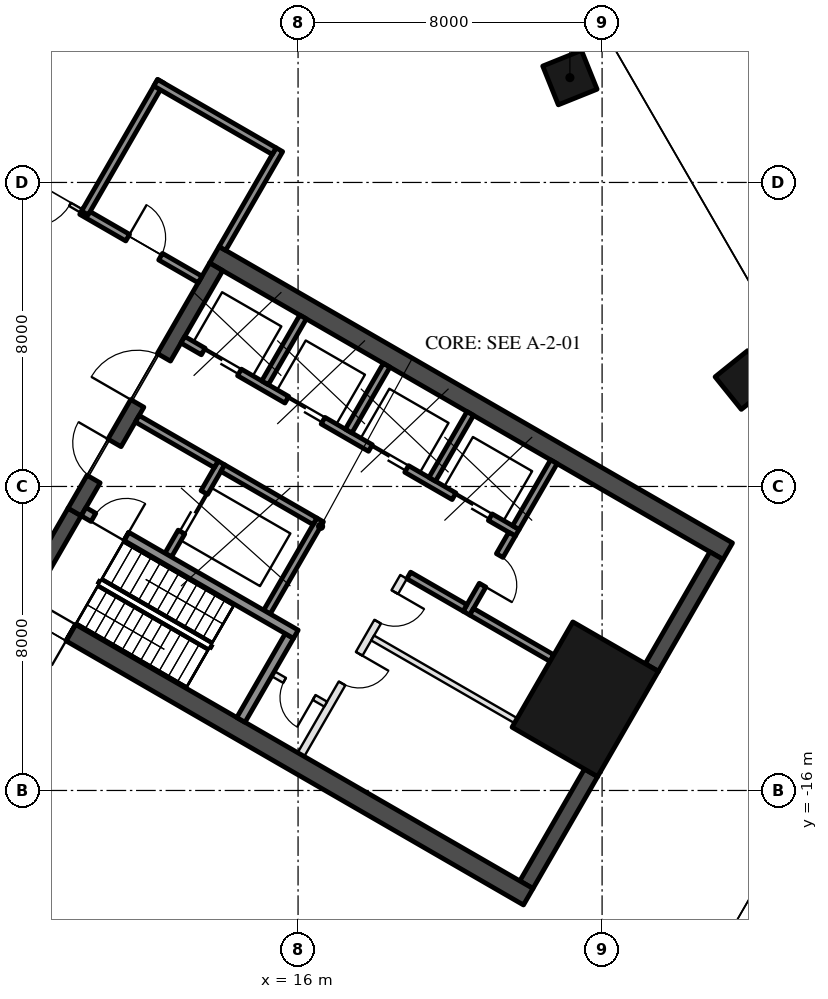
"""IFC4 building model, lengths in metres.
Left out: names, types, materials, properties, quantities, classifications, styles, units other than length and angle.
Written with IfcOpenShell. Run it as: python <this file> out.ifc"""

import sys

from ifc_helpers import new_model, si_unit, direction, frame, frame_2d, origin, origin_2d, place, context, subcontext, project, spatial, rectangle, hollow_rectangle, extrude, boolean, halfspace, element, fill, save


model = new_model("IFC4")
c1 = context("Model", 3, precision=1e-05, world=origin(), true_north=direction((0.0, 1.0)))
c2 = subcontext(c1, "Body", "Model", "MODEL_VIEW")
j1 = project(units=[si_unit("LENGTHUNIT", "METRE"), si_unit("PLANEANGLEUNIT", "RADIAN")], contexts=[c1])
p1 = place(None, origin())
s1 = spatial("IfcSite", under=j1, at=p1, CompositionType="ELEMENT")
p2 = place(p1, origin())
s2 = spatial("IfcBuilding", under=s1, at=p2, CompositionType="ELEMENT")
p3 = place(p2, origin())
s3 = spatial("IfcBuildingStorey", under=s2, at=p3, CompositionType="ELEMENT", Elevation=0.0)
p4 = place(p3, frame((27.747, -5.199, 0.0), z_axis=(-0.187040427199, 0.029060254354, 0.981922288274), x_axis=(0.488808494451, -0.86427960463, 0.118688755878)))
e1 = element("IfcColumn", 1, at=p4, inside=s3, PredefinedType="COLUMN", context=c2, shape_type="SweptSolid", body=[
    boolean("DIFFERENCE", extrude(hollow_rectangle(XDim=1.1, YDim=1.1, WallThickness=0.05, at=origin_2d()), origin(), (0.0, 0.0, 1.0), 9.166), halfspace(frame((0.0, 0.0, 9.146), z_axis=(0.0, 0.0, 1.0), x_axis=(1.0, 0.0, 0.0)), False)),
])
p5 = place(p3, frame((23.153, 2.758, 0.0), z_axis=(-0.158231651294, -0.022440027718, 0.987146994973), x_axis=(0.495168958636, -0.866745273107, 0.059668534009)))
e2 = element("IfcColumn", 2, at=p5, inside=s3, PredefinedType="COLUMN", context=c2, shape_type="SweptSolid", body=[
    boolean("DIFFERENCE", extrude(hollow_rectangle(XDim=1.1, YDim=1.1, WallThickness=0.05, at=origin_2d()), origin(), (0.0, 0.0, 1.0), 9.117), halfspace(frame((0.0, 0.0, 9.101), z_axis=(0.0, 0.0, 1.0), x_axis=(1.0, 0.0, 0.0)), False)),
])
p6 = place(p3, frame((23.556, -13.6, 0.0), z_axis=(0.0, 0.0, 1.0), x_axis=(0.5, 0.866025403784, 0.0)))
e3 = element("IfcColumn", 3, at=p6, inside=s3, PredefinedType="COLUMN", context=c2, shape_type="SweptSolid", body=[
    extrude(hollow_rectangle(XDim=3.2, YDim=2.6, WallThickness=0.08, at=origin_2d()), origin(), (0.0, 0.0, 1.0), 9.0),
])
p7 = place(p3, frame((13.797, -1.903, 0.0), z_axis=(0.0, 0.0, 1.0), x_axis=(0.866024264262, -0.500001973705, 0.0)))
e4 = element("IfcWall", 4, at=p7, inside=s3, PredefinedType="SHEAR", context=c2, shape_type="SweptSolid", body=[
    extrude(rectangle(XDim=15.6, YDim=0.5, at=frame_2d((7.8, 0.0))), origin(), (0.0, 0.0, 1.0), 8.7),
])
p8 = place(p3, frame((25.309, -12.764, 0.0), z_axis=(0.0, 0.0, 1.0), x_axis=(0.499977295307, 0.866038511948, 0.0)))
e5 = element("IfcWall", 5, at=p8, inside=s3, PredefinedType="SHEAR", context=c2, shape_type="SweptSolid", body=[
    extrude(rectangle(XDim=3.4, YDim=0.4, at=frame_2d((1.7, 0.0))), origin(), (0.0, 0.0, 1.0), 8.7),
])
p9 = place(p3, frame((22.009, -18.48, 0.0), z_axis=(0.0, 0.0, 1.0), x_axis=(0.500008388397, 0.866020560687, 0.0)))
e6 = element("IfcWall", 6, at=p9, inside=s3, PredefinedType="SHEAR", context=c2, shape_type="SweptSolid", body=[
    extrude(rectangle(XDim=3.4, YDim=0.4, at=frame_2d((1.7, 0.0))), origin(), (0.0, 0.0, 1.0), 8.7),
])
p10 = place(p3, frame((14.496, -14.143, 0.0), z_axis=(0.0, 0.0, 1.0), x_axis=(0.500062241894, 0.865989465428, 0.0)))
e7 = element("IfcWall", 7, at=p10, inside=s3, PredefinedType="SHEAR", context=c2, shape_type="SweptSolid", body=[
    extrude(rectangle(XDim=2.55, YDim=0.25, at=frame_2d((1.275, 0.0))), origin(), (0.0, 0.0, 1.0), 8.7),
])
p11 = place(p3, frame((15.181, -11.305, 0.0), z_axis=(0.0, 0.0, 1.0), x_axis=(0.49994636267, 0.866056369097, 0.0)))
e8 = element("IfcWall", 8, at=p11, inside=s3, PredefinedType="SHEAR", context=c2, shape_type="SweptSolid", body=[
    extrude(rectangle(XDim=2.8, YDim=0.2, at=frame_2d((1.4, 0.0))), origin(), (0.0, 0.0, 1.0), 8.7),
])
p12 = place(p3, frame((12.583, -9.805, 0.0), z_axis=(0.0, 0.0, 1.0), x_axis=(0.49994636267, 0.866056369097, 0.0)))
e9 = element("IfcWall", 9, at=p12, inside=s3, PredefinedType="SHEAR", context=c2, shape_type="SweptSolid", body=[
    extrude(rectangle(XDim=2.8, YDim=0.2, at=frame_2d((1.4, 0.0))), origin(), (0.0, 0.0, 1.0), 8.7),
])
p13 = place(p12, frame((0.7, 0.0, 0.0)))
e10 = element("IfcOpeningElement", 10, at=p13, cuts=e9, PredefinedType="OPENING", context=c2, shape_type="SweptSolid", body=[
    extrude(rectangle(XDim=1.2, YDim=2.1, at=frame_2d((0.6, 1.05))), frame((0.0, 0.11, 0.0), z_axis=(0.0, -1.0, 0.0), x_axis=(1.0, 0.0, 0.0)), (0.0, 0.0, 1.0), 0.22),
])
p14 = place(p3, frame((11.768, -6.217, 0.0), z_axis=(0.0, 0.0, 1.0), x_axis=(0.866050077142, -0.499957262057, 0.0)))
e11 = element("IfcWall", 11, at=p14, inside=s3, PredefinedType="SHEAR", context=c2, shape_type="SweptSolid", body=[
    extrude(rectangle(XDim=2.4, YDim=0.2, at=frame_2d((1.2, 0.0))), origin(), (0.0, 0.0, 1.0), 8.7),
])
p15 = place(p3, frame((14.02, -7.517, 0.0), z_axis=(0.0, 0.0, 1.0), x_axis=(0.866034573852, -0.49998411664, 0.0)))
e12 = element("IfcWall", 12, at=p15, inside=s3, PredefinedType="SHEAR", context=c2, shape_type="SweptSolid", body=[
    extrude(rectangle(XDim=2.8, YDim=0.2, at=frame_2d((1.4, 0.0))), origin(), (0.0, 0.0, 1.0), 8.7),
])
p16 = place(p3, frame((12.968, -4.138, 0.0), z_axis=(0.0, 0.0, 1.0), x_axis=(0.866028328073, -0.49999493495, 0.0)))
e13 = element("IfcWall", 13, at=p16, inside=s3, PredefinedType="SHEAR", context=c2, shape_type="SweptSolid", body=[
    extrude(rectangle(XDim=10.16, YDim=0.2, at=frame_2d((5.08, 0.0))), origin(), (0.0, 0.0, 1.0), 8.7),
])
p17 = place(p16, frame((0.62, 0.0, 0.0)))
e14 = element("IfcOpeningElement", 14, at=p17, cuts=e13, PredefinedType="OPENING", context=c2, shape_type="SweptSolid", body=[
    extrude(rectangle(XDim=1.1, YDim=2.1, at=frame_2d((0.55, 1.05))), frame((0.0, 0.11, 0.0), z_axis=(0.0, -1.0, 0.0), x_axis=(1.0, 0.0, 0.0)), (0.0, 0.0, 1.0), 0.22),
])
p18 = place(p16, frame((3.16, 0.0, 0.0)))
e15 = element("IfcOpeningElement", 15, at=p18, cuts=e13, PredefinedType="OPENING", context=c2, shape_type="SweptSolid", body=[
    extrude(rectangle(XDim=1.1, YDim=2.1, at=frame_2d((0.55, 1.05))), frame((0.0, 0.11, 0.0), z_axis=(0.0, -1.0, 0.0), x_axis=(1.0, 0.0, 0.0)), (0.0, 0.0, 1.0), 0.22),
])
p19 = place(p16, frame((5.7, 0.0, 0.0)))
e16 = element("IfcOpeningElement", 16, at=p19, cuts=e13, PredefinedType="OPENING", context=c2, shape_type="SweptSolid", body=[
    extrude(rectangle(XDim=1.1, YDim=2.1, at=frame_2d((0.55, 1.05))), frame((0.0, 0.11, 0.0), z_axis=(0.0, -1.0, 0.0), x_axis=(1.0, 0.0, 0.0)), (0.0, 0.0, 1.0), 0.22),
])
p20 = place(p16, frame((8.24, 0.0, 0.0)))
e17 = element("IfcOpeningElement", 17, at=p20, cuts=e13, PredefinedType="OPENING", context=c2, shape_type="SweptSolid", body=[
    extrude(rectangle(XDim=1.1, YDim=2.1, at=frame_2d((0.55, 1.05))), frame((0.0, 0.11, 0.0), z_axis=(0.0, -1.0, 0.0), x_axis=(1.0, 0.0, 0.0)), (0.0, 0.0, 1.0), 0.22),
])
p21 = place(p3, frame((20.43, -11.333, 0.0), z_axis=(0.0, 0.0, 1.0), x_axis=(0.500001309137, 0.866024647952, 0.0)))
e18 = element("IfcWall", 18, at=p21, inside=s3, PredefinedType="SHEAR", context=c2, shape_type="SweptSolid", body=[
    extrude(rectangle(XDim=2.4, YDim=0.2, at=frame_2d((1.2, 0.0))), origin(), (0.0, 0.0, 1.0), 8.7),
])
p22 = place(p21, frame((0.85, 0.0, 0.0)))
e19 = element("IfcOpeningElement", 19, at=p22, cuts=e18, PredefinedType="OPENING", context=c2, shape_type="SweptSolid", body=[
    extrude(rectangle(XDim=0.9, YDim=2.1, at=frame_2d((0.45, 1.05))), frame((0.0, 0.11, 0.0), z_axis=(0.0, -1.0, 0.0), x_axis=(1.0, 0.0, 0.0)), (0.0, 0.0, 1.0), 0.22),
])
p23 = place(p3, frame((18.913, -10.342, 0.0), z_axis=(0.0, 0.0, 1.0), x_axis=(0.866038183914, -0.499977863513, 0.0)))
e20 = element("IfcWall", 20, at=p23, inside=s3, PredefinedType="SHEAR", context=c2, shape_type="SweptSolid", body=[
    extrude(rectangle(XDim=1.71, YDim=0.2, at=frame_2d((0.855, 0.0))), origin(), (0.0, 0.0, 1.0), 8.7),
])
for number, where, z_axis, x_axis in (
    (21, (15.131, -5.272, 0.0), (0.0, 0.0, 1.0), (0.5, 0.866, 0.0)),
    (22, (17.331, -6.542, 0.0), (0.0, 0.0, 1.0), (0.5, 0.866, 0.0)),
    (23, (19.531, -7.812, 0.0), (0.0, 0.0, 1.0), (0.5, 0.866, 0.0)),
    (24, (21.73, -9.082, 0.0), (0.0, 0.0, 1.0), (0.5, 0.866, 0.0)),
):
    element("IfcWall", number, at=place(p3, frame(where, z_axis=z_axis, x_axis=x_axis)), inside=s3, PredefinedType="SHEAR", context=c2, shape_type="SweptSolid", body=[
        extrude(rectangle(XDim=2.0, YDim=0.2, at=frame_2d((1.0, 0.0))), origin(), (0.0, 0.0, 1.0), 8.7),
    ])
p24 = place(p3, frame((20.567, -11.297, 0.0), z_axis=(0.0, 0.0, 1.0), x_axis=(0.866048967903, -0.499959183527, 0.0)))
e25 = element("IfcWall", 25, at=p24, inside=s3, PredefinedType="SHEAR", context=c2, shape_type="SweptSolid", body=[
    extrude(rectangle(XDim=2.44, YDim=0.2, at=frame_2d((1.22, 0.0))), origin(), (0.0, 0.0, 1.0), 8.7),
])
p25 = place(p3, frame((16.076, -15.055, 0.0), z_axis=(0.0, 0.0, 1.0), x_axis=(0.499995103361, 0.866028230842, 0.0)))
e26 = element("IfcWall", 26, at=p25, inside=s3, PredefinedType="PARTITIONING", context=c2, shape_type="SweptSolid", body=[
    extrude(rectangle(XDim=5.4, YDim=0.2, at=frame_2d((2.7, 0.0))), origin(), (0.0, 0.0, 1.0), 8.7),
])
p26 = place(p25, frame((2.163, 0.0, 0.0)))
e27 = element("IfcOpeningElement", 27, at=p26, cuts=e26, PredefinedType="OPENING", context=c2, shape_type="SweptSolid", body=[
    extrude(rectangle(XDim=0.9, YDim=2.1, at=frame_2d((0.45, 1.05))), frame((0.0, 0.11, 0.0), z_axis=(0.0, -1.0, 0.0), x_axis=(1.0, 0.0, 0.0)), (0.0, 0.0, 1.0), 0.22),
])
p27 = place(p25, frame((4.038, 0.0, 0.0)))
e28 = element("IfcOpeningElement", 28, at=p27, cuts=e26, PredefinedType="OPENING", context=c2, shape_type="SweptSolid", body=[
    extrude(rectangle(XDim=0.9, YDim=2.1, at=frame_2d((0.45, 1.05))), frame((0.0, 0.11, 0.0), z_axis=(0.0, -1.0, 0.0), x_axis=(1.0, 0.0, 0.0)), (0.0, 0.0, 1.0), 0.22),
])
p28 = place(p3, frame((15.342, -12.928, 0.0), z_axis=(0.0, 0.0, 1.0), x_axis=(0.865989903783, -0.500061482766, 0.0)))
e29 = element("IfcWall", 29, at=p28, inside=s3, PredefinedType="PARTITIONING", context=c2, shape_type="SweptSolid", body=[
    extrude(rectangle(XDim=1.6, YDim=0.15, at=frame_2d((0.8, 0.0))), origin(), (0.0, 0.0, 1.0), 8.7),
])
p29 = place(p28, frame((0.35, 0.0, 0.0)))
e30 = element("IfcOpeningElement", 30, at=p29, cuts=e29, PredefinedType="OPENING", context=c2, shape_type="SweptSolid", body=[
    extrude(rectangle(XDim=0.9, YDim=2.1, at=frame_2d((0.45, 1.05))), frame((0.0, 0.085, 0.0), z_axis=(0.0, -1.0, 0.0), x_axis=(1.0, 0.0, 0.0)), (0.0, 0.0, 1.0), 0.17),
])
p30 = place(p3, frame((17.963, -11.987, 0.0), z_axis=(0.0, 0.0, 1.0), x_axis=(0.866013608182, -0.500020430026, 0.0)))
e31 = element("IfcWall", 31, at=p30, inside=s3, PredefinedType="PARTITIONING", context=c2, shape_type="SweptSolid", body=[
    extrude(rectangle(XDim=4.35, YDim=0.15, at=frame_2d((2.175, 0.0))), origin(), (0.0, 0.0, 1.0), 8.7),
])
p31 = place(p3, frame((8.547, -10.997, 0.0), z_axis=(0.0, 0.0, 1.0), x_axis=(0.866033076574, -0.499986710104, 0.0)))
e32 = element("IfcWall", 32, at=p31, inside=s3, PredefinedType="SHEAR", context=c2, shape_type="SweptSolid", body=[
    extrude(rectangle(XDim=1.706, YDim=0.5, at=frame_2d((0.853, 0.0))), origin(), (0.0, 0.0, 1.0), 8.7),
])
p32 = place(p31, frame((0.7, 0.0, 0.0)))
e33 = element("IfcOpeningElement", 33, at=p32, cuts=e32, PredefinedType="OPENING", context=c2, shape_type="SweptSolid", body=[
    extrude(rectangle(XDim=1.0, YDim=2.1, at=frame_2d((0.5, 1.05))), frame((0.0, 0.26, 0.0), z_axis=(0.0, -1.0, 0.0), x_axis=(1.0, 0.0, 0.0)), (0.0, 0.0, 1.0), 0.52),
])
p33 = place(p3, frame((10.024, -11.85, 0.0), z_axis=(0.0, 0.0, 1.0), x_axis=(0.86602318214, -0.500003847982, 0.0)))
e34 = element("IfcWall", 34, at=p33, inside=s3, PredefinedType="SHEAR", context=c2, shape_type="SweptSolid", body=[
    extrude(rectangle(XDim=13.894, YDim=0.5, at=frame_2d((6.947, 0.0))), origin(), (0.0, 0.0, 1.0), 8.7),
])
p34 = place(p3, frame((8.845, -10.88, 0.0), z_axis=(0.0, 0.0, 1.0), x_axis=(0.499990435942, 0.866030925526, 0.0)))
e35 = element("IfcWall", 35, at=p34, inside=s3, PredefinedType="SHEAR", context=c2, shape_type="SweptSolid", body=[
    extrude(rectangle(XDim=2.55, YDim=0.4, at=frame_2d((1.275, 0.0))), origin(), (0.0, 0.0, 1.0), 8.7),
])
p35 = place(p3, frame((10.12, -8.672, 0.0), z_axis=(0.0, 0.0, 1.0), x_axis=(0.500008956979, 0.866020232408, 0.0)))
e36 = element("IfcWall", 36, at=p35, inside=s3, PredefinedType="SHEAR", context=c2, shape_type="SweptSolid", body=[
    extrude(rectangle(XDim=7.45, YDim=0.4, at=frame_2d((3.725, 0.0))), origin(), (0.0, 0.0, 1.0), 8.7),
])
p36 = place(p35, frame((1.0, 0.0, 0.0)))
e37 = element("IfcOpeningElement", 37, at=p36, cuts=e36, PredefinedType="OPENING", context=c2, shape_type="SweptSolid", body=[
    extrude(rectangle(XDim=1.1, YDim=2.1, at=frame_2d((0.55, 1.05))), frame((0.0, 0.21, 0.0), z_axis=(0.0, -1.0, 0.0), x_axis=(1.0, 0.0, 0.0)), (0.0, 0.0, 1.0), 0.42),
])
p37 = place(p35, frame((3.3, 0.0, 0.0)))
e38 = element("IfcOpeningElement", 38, at=p37, cuts=e36, PredefinedType="OPENING", context=c2, shape_type="SweptSolid", body=[
    extrude(rectangle(XDim=1.4, YDim=2.1, at=frame_2d((0.7, 1.05))), frame((0.0, 0.21, 0.0), z_axis=(0.0, -1.0, 0.0), x_axis=(1.0, 0.0, 0.0)), (0.0, 0.0, 1.0), 0.42),
])
p38 = place(p3, frame((10.356, -8.664, 0.0), z_axis=(0.0, 0.0, 1.0), x_axis=(0.866095317631, -0.499878886109, 0.0)))
e39 = element("IfcWall", 39, at=p38, inside=s3, PredefinedType="SHEAR", context=c2, shape_type="SweptSolid", body=[
    extrude(rectangle(XDim=1.306, YDim=0.25, at=frame_2d((0.653, 0.0))), origin(), (0.0, 0.0, 1.0), 8.7),
])
p39 = place(p38, frame((0.3, 0.0, 0.0)))
e40 = element("IfcOpeningElement", 40, at=p39, cuts=e39, PredefinedType="OPENING", context=c2, shape_type="SweptSolid", body=[
    extrude(rectangle(XDim=1.0, YDim=2.1, at=frame_2d((0.5, 1.05))), frame((0.0, 0.135, 0.0), z_axis=(0.0, -1.0, 0.0), x_axis=(1.0, 0.0, 0.0)), (0.0, 0.0, 1.0), 0.27),
])
p40 = place(p3, frame((11.487, -9.316, 0.0), z_axis=(0.0, 0.0, 1.0), x_axis=(0.866011695431, -0.500023742813, 0.0)))
e41 = element("IfcWall", 41, at=p40, inside=s3, PredefinedType="SHEAR", context=c2, shape_type="SweptSolid", body=[
    extrude(rectangle(XDim=5.144, YDim=0.25, at=frame_2d((2.572, 0.0))), origin(), (0.0, 0.0, 1.0), 8.7),
])
p41 = place(p3, frame((8.659, 0.197, 0.0), z_axis=(0.0, 0.0, 1.0), x_axis=(0.86601224135, -0.500022797313, 0.0)))
e42 = element("IfcWall", 42, at=p41, inside=s3, PredefinedType="PARTITIONING", context=c2, shape_type="SweptSolid", body=[
    extrude(rectangle(XDim=1.9, YDim=0.1, at=frame_2d((0.95, 0.0))), origin(), (0.0, 0.0, 1.0), 4.5),
])
p42 = place(p41, frame((0.35, 0.0, 0.0)))
e43 = element("IfcOpeningElement", 43, at=p42, cuts=e42, PredefinedType="OPENING", context=c2, shape_type="SweptSolid", body=[
    extrude(rectangle(XDim=1.2, YDim=2.4, at=frame_2d((0.6, 1.2))), frame((0.0, 0.06, 0.0), z_axis=(0.0, -1.0, 0.0), x_axis=(1.0, 0.0, 0.0)), (0.0, 0.0, 1.0), 0.12),
])
p43 = place(p3, frame((10.304, -0.753, 0.0), z_axis=(0.0, 0.0, 1.0), x_axis=(0.866018442252, -0.500012057535, 0.0)))
e44 = element("IfcWall", 44, at=p43, inside=s3, PredefinedType="SOLIDWALL", context=c2, shape_type="SweptSolid", body=[
    extrude(rectangle(XDim=3.6, YDim=0.2, at=frame_2d((1.8, 0.0))), origin(), (0.0, 0.0, 1.0), 4.5),
])
p44 = place(p43, frame((1.4, 0.0, 0.0)))
e45 = element("IfcOpeningElement", 45, at=p44, cuts=e44, PredefinedType="OPENING", context=c2, shape_type="SweptSolid", body=[
    extrude(rectangle(XDim=1.0, YDim=2.1, at=frame_2d((0.5, 1.05))), frame((0.0, 0.11, 0.0), z_axis=(0.0, -1.0, 0.0), x_axis=(1.0, 0.0, 0.0)), (0.0, 0.0, 1.0), 0.22),
])
p45 = place(p3, frame((14.008, -1.737, 0.0), z_axis=(0.0, 0.0, 1.0), x_axis=(0.50002537861, 0.866010750942, 0.0)))
e46 = element("IfcWall", 46, at=p45, inside=s3, PredefinedType="SOLIDWALL", context=c2, shape_type="SweptSolid", body=[
    extrude(rectangle(XDim=3.0, YDim=0.2, at=frame_2d((1.5, 0.0))), origin(), (0.0, 0.0, 1.0), 4.5),
])
p46 = place(p3, frame((10.391, -0.803, 0.0), z_axis=(0.0, 0.0, 1.0), x_axis=(0.49999894854, 0.866026010844, 0.0)))
e47 = element("IfcWall", 47, at=p46, inside=s3, PredefinedType="SOLIDWALL", context=c2, shape_type="SweptSolid", body=[
    extrude(rectangle(XDim=4.0, YDim=0.2, at=frame_2d((2.0, 0.0))), origin(), (0.0, 0.0, 1.0), 4.5),
])
p47 = place(p3, frame((12.254, 2.625, 0.0), z_axis=(0.0, 0.0, 1.0), x_axis=(0.866047807691, -0.499961193289, 0.0)))
e48 = element("IfcWall", 48, at=p47, inside=s3, PredefinedType="SOLIDWALL", context=c2, shape_type="SweptSolid", body=[
    extrude(rectangle(XDim=3.6, YDim=0.2, at=frame_2d((1.8, 0.0))), origin(), (0.0, 0.0, 1.0), 4.5),
])
p48 = place(p13, origin())
e49 = element("IfcDoor", 49, at=p48, inside=s3, OperationType="DOUBLE_DOOR_SLIDING", PredefinedType="DOOR", context=c2, shape_type="SweptSolid", body=[
    extrude(rectangle(XDim=1.2, YDim=2.1, at=frame_2d((0.6, 1.05))), frame((0.0, 0.025, 0.0), z_axis=(0.0, -1.0, 0.0), x_axis=(1.0, 0.0, 0.0)), (0.0, 0.0, 1.0), 0.05),
])
fill(e10, e49)
p49 = place(p29, frame((0.9, 0.0, 0.0), z_axis=(0.0, 0.0, 1.0), x_axis=(-1.0, 0.0, 0.0)))
e50 = element("IfcDoor", 50, at=p49, inside=s3, OperationType="SINGLE_SWING_LEFT", PredefinedType="DOOR", context=c2, shape_type="SweptSolid", body=[
    extrude(rectangle(XDim=0.9, YDim=2.1, at=frame_2d((0.45, 1.05))), frame((0.0, 0.025, 0.0), z_axis=(0.0, -1.0, 0.0), x_axis=(1.0, 0.0, 0.0)), (0.0, 0.0, 1.0), 0.05),
])
fill(e30, e50)
p50 = place(p17, origin())
e51 = element("IfcDoor", 51, at=p50, inside=s3, OperationType="DOUBLE_DOOR_SLIDING", PredefinedType="DOOR", context=c2, shape_type="SweptSolid", body=[
    extrude(rectangle(XDim=1.1, YDim=2.1, at=frame_2d((0.55, 1.05))), frame((0.0, 0.025, 0.0), z_axis=(0.0, -1.0, 0.0), x_axis=(1.0, 0.0, 0.0)), (0.0, 0.0, 1.0), 0.05),
])
fill(e14, e51)
p51 = place(p18, origin())
e52 = element("IfcDoor", 52, at=p51, inside=s3, OperationType="DOUBLE_DOOR_SLIDING", PredefinedType="DOOR", context=c2, shape_type="SweptSolid", body=[
    extrude(rectangle(XDim=1.1, YDim=2.1, at=frame_2d((0.55, 1.05))), frame((0.0, 0.025, 0.0), z_axis=(0.0, -1.0, 0.0), x_axis=(1.0, 0.0, 0.0)), (0.0, 0.0, 1.0), 0.05),
])
fill(e15, e52)
p52 = place(p19, origin())
e53 = element("IfcDoor", 53, at=p52, inside=s3, OperationType="DOUBLE_DOOR_SLIDING", PredefinedType="DOOR", context=c2, shape_type="SweptSolid", body=[
    extrude(rectangle(XDim=1.1, YDim=2.1, at=frame_2d((0.55, 1.05))), frame((0.0, 0.025, 0.0), z_axis=(0.0, -1.0, 0.0), x_axis=(1.0, 0.0, 0.0)), (0.0, 0.0, 1.0), 0.05),
])
fill(e16, e53)
p53 = place(p20, origin())
e54 = element("IfcDoor", 54, at=p53, inside=s3, OperationType="DOUBLE_DOOR_SLIDING", PredefinedType="DOOR", context=c2, shape_type="SweptSolid", body=[
    extrude(rectangle(XDim=1.1, YDim=2.1, at=frame_2d((0.55, 1.05))), frame((0.0, 0.025, 0.0), z_axis=(0.0, -1.0, 0.0), x_axis=(1.0, 0.0, 0.0)), (0.0, 0.0, 1.0), 0.05),
])
fill(e17, e54)
p54 = place(p22, frame((0.9, 0.0, 0.0), z_axis=(0.0, 0.0, 1.0), x_axis=(-1.0, 0.0, 0.0)))
e55 = element("IfcDoor", 55, at=p54, inside=s3, OperationType="SINGLE_SWING_RIGHT", PredefinedType="DOOR", context=c2, shape_type="SweptSolid", body=[
    extrude(rectangle(XDim=0.9, YDim=2.1, at=frame_2d((0.45, 1.05))), frame((0.0, 0.025, 0.0), z_axis=(0.0, -1.0, 0.0), x_axis=(1.0, 0.0, 0.0)), (0.0, 0.0, 1.0), 0.05),
])
fill(e19, e55)
p55 = place(p26, frame((0.9, 0.0, 0.0), z_axis=(0.0, 0.0, 1.0), x_axis=(-1.0, 0.0, 0.0)))
e56 = element("IfcDoor", 56, at=p55, inside=s3, OperationType="SINGLE_SWING_LEFT", PredefinedType="DOOR", context=c2, shape_type="SweptSolid", body=[
    extrude(rectangle(XDim=0.9, YDim=2.1, at=frame_2d((0.45, 1.05))), frame((0.0, 0.025, 0.0), z_axis=(0.0, -1.0, 0.0), x_axis=(1.0, 0.0, 0.0)), (0.0, 0.0, 1.0), 0.05),
])
fill(e27, e56)
p56 = place(p27, frame((0.9, 0.0, 0.0), z_axis=(0.0, 0.0, 1.0), x_axis=(-1.0, 0.0, 0.0)))
e57 = element("IfcDoor", 57, at=p56, inside=s3, OperationType="SINGLE_SWING_LEFT", PredefinedType="DOOR", context=c2, shape_type="SweptSolid", body=[
    extrude(rectangle(XDim=0.9, YDim=2.1, at=frame_2d((0.45, 1.05))), frame((0.0, 0.025, 0.0), z_axis=(0.0, -1.0, 0.0), x_axis=(1.0, 0.0, 0.0)), (0.0, 0.0, 1.0), 0.05),
])
fill(e28, e57)
p57 = place(p36, origin())
e58 = element("IfcDoor", 58, at=p57, inside=s3, OperationType="SINGLE_SWING_RIGHT", PredefinedType="DOOR", context=c2, shape_type="SweptSolid", body=[
    extrude(rectangle(XDim=1.1, YDim=2.1, at=frame_2d((0.55, 1.05))), frame((0.0, 0.025, 0.0), z_axis=(0.0, -1.0, 0.0), x_axis=(1.0, 0.0, 0.0)), (0.0, 0.0, 1.0), 0.05),
])
fill(e37, e58)
p58 = place(p37, origin())
e59 = element("IfcDoor", 59, at=p58, inside=s3, OperationType="DOUBLE_DOOR_SINGLE_SWING", PredefinedType="DOOR", context=c2, shape_type="SweptSolid", body=[
    extrude(rectangle(XDim=1.4, YDim=2.1, at=frame_2d((0.7, 1.05))), frame((0.0, 0.025, 0.0), z_axis=(0.0, -1.0, 0.0), x_axis=(1.0, 0.0, 0.0)), (0.0, 0.0, 1.0), 0.05),
])
fill(e38, e59)
p59 = place(p39, origin())
e60 = element("IfcDoor", 60, at=p59, inside=s3, OperationType="SINGLE_SWING_RIGHT", PredefinedType="DOOR", context=c2, shape_type="SweptSolid", body=[
    extrude(rectangle(XDim=1.0, YDim=2.1, at=frame_2d((0.5, 1.05))), frame((0.0, 0.025, 0.0), z_axis=(0.0, -1.0, 0.0), x_axis=(1.0, 0.0, 0.0)), (0.0, 0.0, 1.0), 0.05),
])
fill(e40, e60)
p60 = place(p32, frame((1.0, 0.0, 0.0), z_axis=(0.0, 0.0, 1.0), x_axis=(-1.0, 0.0, 0.0)))
e61 = element("IfcDoor", 61, at=p60, inside=s3, OperationType="SINGLE_SWING_LEFT", PredefinedType="DOOR", context=c2, shape_type="SweptSolid", body=[
    extrude(rectangle(XDim=1.0, YDim=2.1, at=frame_2d((0.5, 1.05))), frame((0.0, 0.025, 0.0), z_axis=(0.0, -1.0, 0.0), x_axis=(1.0, 0.0, 0.0)), (0.0, 0.0, 1.0), 0.05),
])
fill(e33, e61)
p61 = place(p42, frame((1.2, 0.0, 0.0), z_axis=(0.0, 0.0, 1.0), x_axis=(-1.0, 0.0, 0.0)))
e62 = element("IfcDoor", 62, at=p61, inside=s3, OperationType="SINGLE_SWING_RIGHT", PredefinedType="DOOR", context=c2, shape_type="SweptSolid", body=[
    extrude(rectangle(XDim=1.2, YDim=2.4, at=frame_2d((0.6, 1.2))), frame((0.0, 0.025, 0.0), z_axis=(0.0, -1.0, 0.0), x_axis=(1.0, 0.0, 0.0)), (0.0, 0.0, 1.0), 0.05),
])
fill(e43, e62)
p62 = place(p44, origin())
e63 = element("IfcDoor", 63, at=p62, inside=s3, OperationType="SINGLE_SWING_LEFT", PredefinedType="DOOR", context=c2, shape_type="SweptSolid", body=[
    extrude(rectangle(XDim=1.0, YDim=2.1, at=frame_2d((0.5, 1.05))), frame((0.0, 0.025, 0.0), z_axis=(0.0, -1.0, 0.0), x_axis=(1.0, 0.0, 0.0)), (0.0, 0.0, 1.0), 0.05),
])
fill(e45, e63)
save(model, sys.argv[1])
